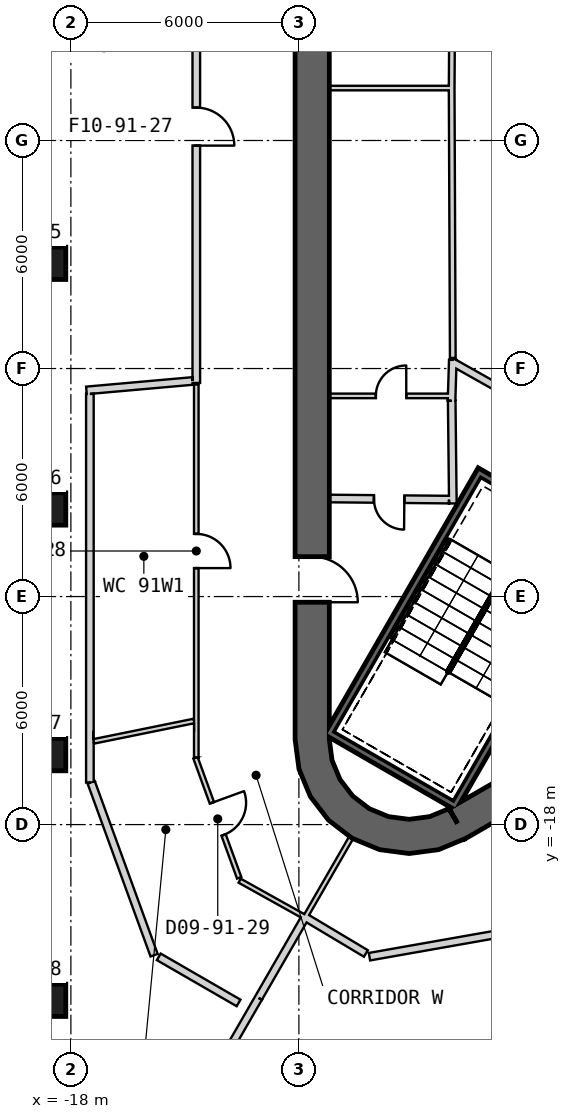
"""IFC4 building model, lengths in metres.
Left out: names, types, materials, properties, quantities, classifications, styles, units other than length and angle.
Written with IfcOpenShell. Run it as: python <this file> out.ifc"""

import sys

from ifc_helpers import new_model, si_unit, direction, frame, frame_2d, origin, origin_2d, place, context, subcontext, project, spatial, polyline, rectangle, outline, extrude, element, fill, save


model = new_model("IFC4")
c1 = context("Model", 3, precision=1e-05, world=origin(), true_north=direction((0.0, 1.0)))
c2 = subcontext(c1, "Body", "Model", "MODEL_VIEW")
j1 = project(units=[si_unit("LENGTHUNIT", "METRE"), si_unit("PLANEANGLEUNIT", "RADIAN")], contexts=[c1])
p1 = place(None, origin())
s1 = spatial("IfcSite", under=j1, at=p1, CompositionType="ELEMENT")
p2 = place(p1, origin())
s2 = spatial("IfcBuilding", under=s1, at=p2, CompositionType="ELEMENT")
p3 = place(p2, frame((0.0, 0.0, 398.3)))
s3 = spatial("IfcBuildingStorey", under=s2, at=p3, CompositionType="ELEMENT", Elevation=398.3)
for number, where, z_axis, x_axis in (
    (1, (-18.834, -3.232, -0.3), (0.0, 0.0, 1.0), (-1.0, 0.0, 0.0)),
    (2, (-18.834, -9.696, -0.3), (0.0, 0.0, 1.0), (-1.0, 0.0, 0.0)),
):
    element("IfcColumn", number, at=place(p3, frame(where, z_axis=z_axis, x_axis=x_axis)), inside=s3, PredefinedType="COLUMN", context=c2, shape_type="SweptSolid", body=[
        extrude(rectangle(XDim=1.4, YDim=0.85, at=origin_2d()), origin(), (0.0, 0.0, 1.0), 6.8),
    ])
for number, where, z_axis, x_axis in (
    (3, (-18.834, -16.16, 0.0), (0.0, 0.0, 1.0), (-1.0, 0.0, 0.0)),
    (4, (-18.834, -22.624, 0.0), (0.0, 0.0, 1.0), (-1.0, 0.0, 0.0)),
):
    element("IfcColumn", number, at=place(p3, frame(where, z_axis=z_axis, x_axis=x_axis)), inside=s3, PredefinedType="COLUMN", context=c2, shape_type="SweptSolid", body=[
        extrude(rectangle(XDim=1.4, YDim=0.85, at=origin_2d()), origin(), (0.0, 0.0, 1.0), 6.5),
    ])
p4 = place(p3, frame((19.475, 2.208, 0.0), z_axis=(0.0, 0.0, 1.0), x_axis=(-0.866028369851, 0.499994862586, 0.0)))
e5 = element("IfcWall", 5, at=p4, inside=s3, PredefinedType="SHEAR", context=c2, shape_type="SweptSolid", body=[
    extrude(rectangle(XDim=31.523, YDim=0.9, at=frame_2d((15.762, 0.0))), origin(), (0.0, 0.0, 1.0), 6.5),
])
p5 = place(p4, frame((3.612, 0.0, 0.0)))
e6 = element("IfcOpeningElement", 6, at=p5, cuts=e5, PredefinedType="OPENING", context=c2, shape_type="SweptSolid", body=[
    extrude(rectangle(XDim=1.2, YDim=2.4, at=frame_2d((0.6, 1.2))), frame((0.0, 0.46, 0.0), z_axis=(0.0, -1.0, 0.0), x_axis=(1.0, 0.0, 0.0)), (0.0, 0.0, 1.0), 0.92),
])
p6 = place(p4, frame((26.712, 0.0, 0.0)))
e7 = element("IfcOpeningElement", 7, at=p6, cuts=e5, PredefinedType="OPENING", context=c2, shape_type="SweptSolid", body=[
    extrude(rectangle(XDim=1.2, YDim=2.4, at=frame_2d((0.6, 1.2))), frame((0.0, 0.46, 0.0), z_axis=(0.0, -1.0, 0.0), x_axis=(1.0, 0.0, 0.0)), (0.0, 0.0, 1.0), 0.92),
])
p7 = place(p3, frame((-11.65, 15.762, 0.0), z_axis=(0.0, 0.0, 1.0), x_axis=(0.0, -1.0, 0.0)))
e8 = element("IfcWall", 8, at=p7, inside=s3, PredefinedType="SHEAR", context=c2, shape_type="SweptSolid", body=[
    extrude(rectangle(XDim=31.523, YDim=0.9, at=frame_2d((15.762, 0.0))), origin(), (0.0, 0.0, 1.0), 6.5),
])
p8 = place(p7, frame((3.612, 0.0, 0.0)))
e9 = element("IfcOpeningElement", 9, at=p8, cuts=e8, PredefinedType="OPENING", context=c2, shape_type="SweptSolid", body=[
    extrude(rectangle(XDim=1.2, YDim=2.4, at=frame_2d((0.6, 1.2))), frame((0.0, 0.46, 0.0), z_axis=(0.0, -1.0, 0.0), x_axis=(1.0, 0.0, 0.0)), (0.0, 0.0, 1.0), 0.92),
])
p9 = place(p7, frame((26.712, 0.0, 0.0)))
e10 = element("IfcOpeningElement", 10, at=p9, cuts=e8, PredefinedType="OPENING", context=c2, shape_type="SweptSolid", body=[
    extrude(rectangle(XDim=1.2, YDim=2.4, at=frame_2d((0.6, 1.2))), frame((0.0, 0.46, 0.0), z_axis=(0.0, -1.0, 0.0), x_axis=(1.0, 0.0, 0.0)), (0.0, 0.0, 1.0), 0.92),
])
p10 = place(p3, frame((-7.825, -17.97, 0.0), z_axis=(0.0, 0.0, 1.0), x_axis=(0.866028369851, 0.499994862586, 0.0)))
e11 = element("IfcWall", 11, at=p10, inside=s3, PredefinedType="SHEAR", context=c2, shape_type="SweptSolid", body=[
    extrude(rectangle(XDim=31.523, YDim=0.9, at=frame_2d((15.762, 0.0))), origin(), (0.0, 0.0, 1.0), 6.5),
])
p11 = place(p10, frame((7.062, 0.0, 0.0)))
e12 = element("IfcOpeningElement", 12, at=p11, cuts=e11, PredefinedType="OPENING", context=c2, shape_type="SweptSolid", body=[
    extrude(rectangle(XDim=1.2, YDim=2.4, at=frame_2d((0.6, 1.2))), frame((0.0, 0.46, 0.0), z_axis=(0.0, -1.0, 0.0), x_axis=(1.0, 0.0, 0.0)), (0.0, 0.0, 1.0), 0.92),
])
p12 = place(p10, frame((9.762, 0.0, 0.0)))
e13 = element("IfcOpeningElement", 13, at=p12, cuts=e11, PredefinedType="OPENING", context=c2, shape_type="SweptSolid", body=[
    extrude(rectangle(XDim=1.2, YDim=2.4, at=frame_2d((0.6, 1.2))), frame((0.0, 0.46, 0.0), z_axis=(0.0, -1.0, 0.0), x_axis=(1.0, 0.0, 0.0)), (0.0, 0.0, 1.0), 0.92),
])
p13 = place(p10, frame((17.862, 0.0, 0.0)))
e14 = element("IfcOpeningElement", 14, at=p13, cuts=e11, PredefinedType="OPENING", context=c2, shape_type="SweptSolid", body=[
    extrude(rectangle(XDim=1.2, YDim=2.4, at=frame_2d((0.6, 1.2))), frame((0.0, 0.46, 0.0), z_axis=(0.0, -1.0, 0.0), x_axis=(1.0, 0.0, 0.0)), (0.0, 0.0, 1.0), 0.92),
])
p14 = place(p10, frame((20.562, 0.0, 0.0)))
e15 = element("IfcOpeningElement", 15, at=p14, cuts=e11, PredefinedType="OPENING", context=c2, shape_type="SweptSolid", body=[
    extrude(rectangle(XDim=1.2, YDim=2.4, at=frame_2d((0.6, 1.2))), frame((0.0, 0.46, 0.0), z_axis=(0.0, -1.0, 0.0), x_axis=(1.0, 0.0, 0.0)), (0.0, 0.0, 1.0), 0.92),
])
p15 = place(p10, frame((26.712, 0.0, 0.0)))
e16 = element("IfcOpeningElement", 16, at=p15, cuts=e11, PredefinedType="OPENING", context=c2, shape_type="SweptSolid", body=[
    extrude(rectangle(XDim=1.2, YDim=2.4, at=frame_2d((0.6, 1.2))), frame((0.0, 0.46, 0.0), z_axis=(0.0, -1.0, 0.0), x_axis=(1.0, 0.0, 0.0)), (0.0, 0.0, 1.0), 0.92),
])
p16 = place(p10, frame((3.612, 0.0, 0.0)))
e17 = element("IfcOpeningElement", 17, at=p16, cuts=e11, PredefinedType="OPENING", context=c2, shape_type="SweptSolid", body=[
    extrude(rectangle(XDim=1.2, YDim=2.4, at=frame_2d((0.6, 1.2))), frame((0.0, 0.46, 0.0), z_axis=(0.0, -1.0, 0.0), x_axis=(1.0, 0.0, 0.0)), (0.0, 0.0, 1.0), 0.92),
])
p17 = place(p3, origin())
e18 = element("IfcWall", 18, at=p17, inside=s3, PredefinedType="SHEAR", context=c2, shape_type="SweptSolid", body=[
    extrude(outline(polyline([(-12.1, -15.762), (-11.998, -16.538), (-11.698, -17.262), (-11.221, -17.883), (-10.6, -18.36), (-9.876, -18.659), (-9.1, -18.762), (-8.323, -18.659), (-7.6, -18.36), (-8.05, -17.58), (-8.556, -17.79), (-9.1, -17.862), (-9.644, -17.79), (-10.15, -17.58), (-10.585, -17.247), (-10.919, -16.812), (-11.128, -16.305), (-11.2, -15.762), (-12.1, -15.762)])), origin(), (0.0, 0.0, 1.0), 6.5),
])
p18 = place(p3, frame((-3.905, -10.563, -0.3), z_axis=(0.0, 0.0, 1.0), x_axis=(-0.500012932018, -0.866017937352, 0.0)))
e19 = element("IfcWall", 19, at=p18, inside=s3, PredefinedType="SHEAR", context=c2, shape_type="SweptSolid", body=[
    extrude(rectangle(XDim=8.1, YDim=0.2, at=frame_2d((4.05, 0.0))), origin(), (0.0, 0.0, 1.0), 6.5),
])
p19 = place(p3, frame((-11.282, -15.541, -0.3), z_axis=(0.0, 0.0, 1.0), x_axis=(0.866000483506, -0.500043160704, 0.0)))
e20 = element("IfcWall", 20, at=p19, inside=s3, PredefinedType="SHEAR", context=c2, shape_type="SweptSolid", body=[
    extrude(rectangle(XDim=3.8, YDim=0.2, at=frame_2d((1.9, 0.0))), origin(), (0.0, 0.0, 1.0), 6.5),
])
p20 = place(p3, frame((-7.196, -8.663, -0.3), z_axis=(0.0, 0.0, 1.0), x_axis=(-0.499997992926, -0.866026562566, 0.0)))
e21 = element("IfcWall", 21, at=p20, inside=s3, PredefinedType="SHEAR", context=c2, shape_type="SweptSolid", body=[
    extrude(rectangle(XDim=7.9, YDim=0.2, at=frame_2d((3.95, 0.0))), origin(), (0.0, 0.0, 1.0), 6.5),
])
p21 = place(p3, frame((-4.041, -10.599, -0.3), z_axis=(0.0, 0.0, 1.0), x_axis=(-0.866047807691, 0.499961193289, 0.0)))
e22 = element("IfcWall", 22, at=p21, inside=s3, PredefinedType="SHEAR", context=c2, shape_type="SweptSolid", body=[
    extrude(rectangle(XDim=3.6, YDim=0.2, at=frame_2d((1.8, 0.0))), origin(), (0.0, 0.0, 1.0), 6.5),
])
p22 = place(p21, frame((1.25, 0.0, 0.3)))
e23 = element("IfcOpeningElement", 23, at=p22, cuts=e22, PredefinedType="OPENING", context=c2, shape_type="SweptSolid", body=[
    extrude(rectangle(XDim=1.1, YDim=2.1, at=frame_2d((0.55, 1.05))), frame((0.0, 0.11, 0.0), z_axis=(0.0, -1.0, 0.0), x_axis=(1.0, 0.0, 0.0)), (0.0, 0.0, 1.0), 0.22),
])
p23 = place(p3, frame((-7.95, 1.38, 0.0), z_axis=(0.0, 0.0, 1.0), x_axis=(-1.0, 0.0, 0.0)))
e24 = element("IfcWall", 24, at=p23, inside=s3, PredefinedType="PARTITIONING", context=c2, shape_type="SweptSolid", body=[
    extrude(rectangle(XDim=3.25, YDim=0.12, at=frame_2d((1.625, 0.0))), origin(), (0.0, 0.0, 1.0), 6.2),
])
p24 = place(p3, frame((-7.951, 5.722, 0.0), z_axis=(0.0, 0.0, 1.0), x_axis=(-0.006701139535, -0.999977547112, 0.0)))
e25 = element("IfcWall", 25, at=p24, inside=s3, PredefinedType="PLUMBINGWALL", context=c2, shape_type="SweptSolid", body=[
    extrude(rectangle(XDim=4.372, YDim=0.15, at=frame_2d((2.186, 0.0))), origin(), (0.0, 0.0, 1.0), 6.2),
])
p25 = place(p3, frame((-11.2, -6.72, 0.0), z_axis=(0.0, 0.0, 1.0), x_axis=(1.0, 0.0, 0.0)))
e26 = element("IfcWall", 26, at=p25, inside=s3, PredefinedType="PARTITIONING", context=c2, shape_type="SweptSolid", body=[
    extrude(rectangle(XDim=3.25, YDim=0.12, at=frame_2d((1.625, 0.0))), origin(), (0.0, 0.0, 1.0), 6.2),
])
p26 = place(p25, frame((1.225, 0.0, 0.0)))
e27 = element("IfcOpeningElement", 27, at=p26, cuts=e26, PredefinedType="OPENING", context=c2, shape_type="SweptSolid", body=[
    extrude(rectangle(XDim=0.8, YDim=2.1, at=frame_2d((0.4, 1.05))), frame((0.0, 0.07, 0.0), z_axis=(0.0, -1.0, 0.0), x_axis=(1.0, 0.0, 0.0)), (0.0, 0.0, 1.0), 0.14),
])
p27 = place(p3, frame((-7.983, -6.85, 0.0), z_axis=(0.0, 0.0, 1.0), x_axis=(0.030803413295, 0.999525462272, 0.0)))
e28 = element("IfcWall", 28, at=p27, inside=s3, PredefinedType="PARTITIONING", context=c2, shape_type="SweptSolid", body=[
    extrude(rectangle(XDim=1.078, YDim=0.2, at=frame_2d((0.539, 0.0))), origin(), (0.0, 0.0, 1.0), 6.2),
])
p28 = place(p3, frame((-7.98, 1.35, 0.0), z_axis=(0.0, 0.0, 1.0), x_axis=(0.004177130679, -0.999991275752, 0.0)))
e29 = element("IfcWall", 29, at=p28, inside=s3, PredefinedType="PLUMBINGWALL", context=c2, shape_type="SweptSolid", body=[
    extrude(rectangle(XDim=7.072, YDim=0.15, at=frame_2d((3.536, 0.0))), origin(), (0.0, 0.0, 1.0), 6.2),
])
p29 = place(p3, frame((-7.949, -9.55, 0.0), z_axis=(0.0, 0.0, 1.0), x_axis=(-0.011121475088, 0.999938154483, 0.0)))
e30 = element("IfcWall", 30, at=p29, inside=s3, PredefinedType="PARTITIONING", context=c2, shape_type="SweptSolid", body=[
    extrude(rectangle(XDim=2.7, YDim=0.2, at=frame_2d((1.35, 0.0))), origin(), (0.0, 0.0, 1.0), 6.2),
])
p30 = place(p3, frame((-11.2, -9.42, 0.0), z_axis=(0.0, 0.0, 1.0), x_axis=(0.999957467379, -0.009222983926, 0.0)))
e31 = element("IfcWall", 31, at=p30, inside=s3, PredefinedType="PARTITIONING", context=c2, shape_type="SweptSolid", body=[
    extrude(rectangle(XDim=3.15, YDim=0.2, at=frame_2d((1.575, 0.0))), origin(), (0.0, 0.0, 1.0), 6.2),
])
p31 = place(p30, frame((1.175, 0.0, 0.0)))
e32 = element("IfcOpeningElement", 32, at=p31, cuts=e31, PredefinedType="OPENING", context=c2, shape_type="SweptSolid", body=[
    extrude(rectangle(XDim=0.8, YDim=2.1, at=frame_2d((0.4, 1.05))), frame((0.0, 0.11, 0.0), z_axis=(0.0, -1.0, 0.0), x_axis=(1.0, 0.0, 0.0)), (0.0, 0.0, 1.0), 0.22),
])
p32 = place(p3, frame((-7.976, -5.823, 0.0), z_axis=(0.0, 0.0, 1.0), x_axis=(0.871329070694, -0.490699144653, 0.0)))
e33 = element("IfcWall", 33, at=p32, inside=s3, PredefinedType="PARTITIONING", context=c2, shape_type="SweptSolid", body=[
    extrude(rectangle(XDim=2.726, YDim=0.2, at=frame_2d((1.363, 0.0))), origin(), (0.0, 0.0, 1.0), 6.2),
])
p33 = place(p3, frame((-14.7, 7.322, 0.0), z_axis=(0.0, 0.0, 1.0), x_axis=(0.0, -1.0, 0.0)))
e34 = element("IfcWall", 34, at=p33, inside=s3, PredefinedType="PARTITIONING", context=c2, shape_type="SweptSolid", body=[
    extrude(rectangle(XDim=13.701, YDim=0.2, at=frame_2d((6.851, 0.0))), origin(), (0.0, 0.0, 1.0), 5.67),
])
p34 = place(p33, frame((6.456, 0.0, 0.0)))
e35 = element("IfcOpeningElement", 35, at=p34, cuts=e34, PredefinedType="OPENING", context=c2, shape_type="SweptSolid", body=[
    extrude(rectangle(XDim=1.0, YDim=2.1, at=frame_2d((0.5, 1.05))), frame((0.0, 0.11, 0.0), z_axis=(0.0, -1.0, 0.0), x_axis=(1.0, 0.0, 0.0)), (0.0, 0.0, 1.0), 0.22),
])
p35 = place(p3, frame((-14.7, -6.419, 0.0), z_axis=(0.0, 0.0, 1.0), x_axis=(0.0, -1.0, 0.0)))
e36 = element("IfcWall", 36, at=p35, inside=s3, PredefinedType="PARTITIONING", context=c2, shape_type="SweptSolid", body=[
    extrude(rectangle(XDim=8.835, YDim=0.12, at=frame_2d((4.418, 0.0))), origin(), (0.0, 0.0, 1.0), 5.57),
])
p36 = place(p35, frame((3.932, 0.0, 0.0)))
e37 = element("IfcOpeningElement", 37, at=p36, cuts=e36, PredefinedType="OPENING", context=c2, shape_type="SweptSolid", body=[
    extrude(rectangle(XDim=0.9, YDim=2.1, at=frame_2d((0.45, 1.05))), frame((0.0, 0.07, 0.0), z_axis=(0.0, -1.0, 0.0), x_axis=(1.0, 0.0, 0.0)), (0.0, 0.0, 1.0), 0.14),
])
p37 = place(p3, frame((-14.7, -15.255, 0.0), z_axis=(0.0, 0.0, 1.0), x_axis=(0.0, -1.0, 0.0)))
e38 = element("IfcWall", 38, at=p37, inside=s3, PredefinedType="PARTITIONING", context=c2, shape_type="SweptSolid", body=[
    extrude(rectangle(XDim=0.985, YDim=0.12, at=frame_2d((0.492, 0.0))), origin(), (0.0, 0.0, 1.0), 6.2),
])
p38 = place(p3, frame((-13.559, -19.476, 0.0), z_axis=(0.0, 0.0, 1.0), x_axis=(0.873536168316, -0.486759245052, 0.0)))
e39 = element("IfcWall", 39, at=p38, inside=s3, PredefinedType="PARTITIONING", context=c2, shape_type="SweptSolid", body=[
    extrude(rectangle(XDim=2.005, YDim=0.12, at=frame_2d((1.002, 0.0))), origin(), (0.0, 0.0, 1.0), 5.57),
])
p39 = place(p3, frame((-14.72, -16.243, 0.0), z_axis=(0.0, 0.0, 1.0), x_axis=(0.342046381322, -0.939683070521, 0.0)))
e40 = element("IfcWall", 40, at=p39, inside=s3, PredefinedType="PARTITIONING", context=c2, shape_type="SweptSolid", body=[
    extrude(rectangle(XDim=3.36, YDim=0.12, at=frame_2d((1.68, 0.0))), origin(), (0.0, 0.0, 1.0), 5.57),
])
p40 = place(p39, frame((1.26, 0.0, 0.0)))
e41 = element("IfcOpeningElement", 41, at=p40, cuts=e40, PredefinedType="OPENING", context=c2, shape_type="SweptSolid", body=[
    extrude(rectangle(XDim=0.9, YDim=2.1, at=frame_2d((0.45, 1.05))), frame((0.0, 0.07, 0.0), z_axis=(0.0, -1.0, 0.0), x_axis=(1.0, 0.0, 0.0)), (0.0, 0.0, 1.0), 0.14),
])
p41 = place(p3, frame((-10.549, -18.212, 0.0), z_axis=(0.0, 0.0, 1.0), x_axis=(-0.500047596559, -0.865997922154, 0.0)))
e42 = element("IfcWall", 42, at=p41, inside=s3, PredefinedType="PARTITIONING", context=c2, shape_type="SweptSolid", body=[
    extrude(rectangle(XDim=2.6, YDim=0.12, at=frame_2d((1.3, 0.0))), origin(), (0.0, 0.0, 1.0), 5.57),
])
p42 = place(p3, frame((-14.8, -6.328, 0.0), z_axis=(0.0, 0.0, 1.0), x_axis=(-0.996081685844, -0.088437973332, 0.0)))
e43 = element("IfcWall", 43, at=p42, inside=s3, PredefinedType="PARTITIONING", context=c2, shape_type="SweptSolid", body=[
    extrude(rectangle(XDim=2.802, YDim=0.2, at=frame_2d((1.401, 0.0))), origin(), (0.0, 0.0, 1.0), 6.2),
])
p43 = place(p3, frame((-17.5, -16.893, 0.0), z_axis=(0.0, 0.0, 1.0), x_axis=(0.0, 1.0, 0.0)))
e44 = element("IfcWall", 44, at=p43, inside=s3, PredefinedType="PARTITIONING", context=c2, shape_type="SweptSolid", body=[
    extrude(rectangle(XDim=1.052, YDim=0.2, at=frame_2d((0.526, 0.0))), origin(), (0.0, 0.0, 1.0), 6.2),
])
p44 = place(p3, frame((-17.5, -15.841, 0.0), z_axis=(0.0, 0.0, 1.0), x_axis=(0.0, 1.0, 0.0)))
e45 = element("IfcWall", 45, at=p44, inside=s3, PredefinedType="PARTITIONING", context=c2, shape_type="SweptSolid", body=[
    extrude(rectangle(XDim=9.173, YDim=0.2, at=frame_2d((4.586, 0.0))), origin(), (0.0, 0.0, 1.0), 5.57),
])
p45 = place(p3, frame((-17.466, -16.887, 0.0), z_axis=(0.0, 0.0, 1.0), x_axis=(0.342054816013, -0.939680000235, 0.0)))
e46 = element("IfcWall", 46, at=p45, inside=s3, PredefinedType="PARTITIONING", context=c2, shape_type="SweptSolid", body=[
    extrude(rectangle(XDim=4.841, YDim=0.2, at=frame_2d((2.421, 0.0))), origin(), (0.0, 0.0, 1.0), 5.57),
])
p46 = place(p3, frame((-15.688, -21.48, 0.0), z_axis=(0.0, 0.0, 1.0), x_axis=(0.866041403502, -0.499972286653, 0.0)))
e47 = element("IfcWall", 47, at=p46, inside=s3, PredefinedType="PARTITIONING", context=c2, shape_type="SweptSolid", body=[
    extrude(rectangle(XDim=2.425, YDim=0.2, at=frame_2d((1.212, 0.0))), origin(), (0.0, 0.0, 1.0), 6.2),
])
p47 = place(p3, frame((-15.024, -25.962, 0.0), z_axis=(0.0, 0.0, 1.0), x_axis=(0.500004108169, 0.866023031919, 0.0)))
e48 = element("IfcWall", 48, at=p47, inside=s3, PredefinedType="PARTITIONING", context=c2, shape_type="SweptSolid", body=[
    extrude(rectangle(XDim=3.927, YDim=0.2, at=frame_2d((1.963, 0.0))), origin(), (0.0, 0.0, 1.0), 5.57),
])
p48 = place(p3, frame((-17.4, -15.811, 0.0), z_axis=(0.0, 0.0, 1.0), x_axis=(0.979941162084, 0.199287026304, 0.0)))
e49 = element("IfcWall", 49, at=p48, inside=s3, PredefinedType="PARTITIONING", context=c2, shape_type="SweptSolid", body=[
    extrude(rectangle(XDim=2.694, YDim=0.12, at=frame_2d((1.347, 0.0))), origin(), (0.0, 0.0, 1.0), 6.2),
])
p49 = place(p3, frame((-11.849, -20.463, 0.0), z_axis=(0.0, 0.0, 1.0), x_axis=(-0.49997539674, -0.866039608017, 0.0)))
e50 = element("IfcWall", 50, at=p49, inside=s3, PredefinedType="PARTITIONING", context=c2, shape_type="SweptSolid", body=[
    extrude(rectangle(XDim=2.423, YDim=0.2, at=frame_2d((1.211, 0.0))), origin(), (0.0, 0.0, 1.0), 5.57),
])
p50 = place(p3, frame((-10.143, -21.476, 0.0), z_axis=(0.0, 0.0, 1.0), x_axis=(0.98480864774, 0.173643103339, 0.0)))
e51 = element("IfcWall", 51, at=p50, inside=s3, PredefinedType="PARTITIONING", context=c2, shape_type="SweptSolid", body=[
    extrude(rectangle(XDim=3.329, YDim=0.2, at=frame_2d((1.665, 0.0))), origin(), (0.0, 0.0, 1.0), 5.57),
])
p51 = place(p3, frame((-11.808, -20.452, 0.0), z_axis=(0.0, 0.0, 1.0), x_axis=(0.858362923554, -0.51304297234, 0.0)))
e52 = element("IfcWall", 52, at=p51, inside=s3, PredefinedType="PARTITIONING", context=c2, shape_type="SweptSolid", body=[
    extrude(rectangle(XDim=1.83, YDim=0.2, at=frame_2d((0.915, 0.0))), origin(), (0.0, 0.0, 1.0), 5.57),
])
p52 = place(p26, origin())
e53 = element("IfcDoor", 53, at=p52, inside=s3, OperationType="SINGLE_SWING_RIGHT", PredefinedType="USERDEFINED", context=c2, shape_type="SweptSolid", body=[
    extrude(rectangle(XDim=0.8, YDim=2.1, at=frame_2d((0.4, 1.05))), frame((0.0, 0.025, 0.0), z_axis=(0.0, -1.0, 0.0), x_axis=(1.0, 0.0, 0.0)), (0.0, 0.0, 1.0), 0.05),
])
fill(e27, e53)
p53 = place(p31, origin())
e54 = element("IfcDoor", 54, at=p53, inside=s3, OperationType="SINGLE_SWING_RIGHT", PredefinedType="USERDEFINED", context=c2, shape_type="SweptSolid", body=[
    extrude(rectangle(XDim=0.8, YDim=2.1, at=frame_2d((0.4, 1.05))), frame((0.0, 0.025, 0.0), z_axis=(0.0, -1.0, 0.0), x_axis=(1.0, 0.0, 0.0)), (0.0, 0.0, 1.0), 0.05),
])
fill(e32, e54)
p54 = place(p34, origin())
e55 = element("IfcDoor", 55, at=p54, inside=s3, OperationType="SINGLE_SWING_RIGHT", PredefinedType="USERDEFINED", context=c2, shape_type="SweptSolid", body=[
    extrude(rectangle(XDim=1.0, YDim=2.1, at=frame_2d((0.5, 1.05))), frame((0.0, 0.025, 0.0), z_axis=(0.0, -1.0, 0.0), x_axis=(1.0, 0.0, 0.0)), (0.0, 0.0, 1.0), 0.05),
])
fill(e35, e55)
p55 = place(p36, origin())
e56 = element("IfcDoor", 56, at=p55, inside=s3, OperationType="SINGLE_SWING_RIGHT", PredefinedType="NOTDEFINED", context=c2, shape_type="SweptSolid", body=[
    extrude(rectangle(XDim=0.9, YDim=2.1, at=frame_2d((0.45, 1.05))), frame((0.0, 0.025, 0.0), z_axis=(0.0, -1.0, 0.0), x_axis=(1.0, 0.0, 0.0)), (0.0, 0.0, 1.0), 0.05),
])
fill(e37, e56)
p56 = place(p40, origin())
e57 = element("IfcDoor", 57, at=p56, inside=s3, OperationType="SINGLE_SWING_LEFT", PredefinedType="NOTDEFINED", context=c2, shape_type="SweptSolid", body=[
    extrude(rectangle(XDim=0.9, YDim=2.1, at=frame_2d((0.45, 1.05))), frame((0.0, 0.025, 0.0), z_axis=(0.0, -1.0, 0.0), x_axis=(1.0, 0.0, 0.0)), (0.0, 0.0, 1.0), 0.05),
])
fill(e41, e57)
p57 = place(p9, origin())
e58 = element("IfcDoor", 58, at=p57, inside=s3, OperationType="SINGLE_SWING_RIGHT", PredefinedType="USERDEFINED", context=c2, shape_type="SweptSolid", body=[
    extrude(rectangle(XDim=1.2, YDim=2.4, at=frame_2d((0.6, 1.2))), frame((0.0, 0.025, 0.0), z_axis=(0.0, -1.0, 0.0), x_axis=(1.0, 0.0, 0.0)), (0.0, 0.0, 1.0), 0.05),
])
fill(e10, e58)
save(model, sys.argv[1])
